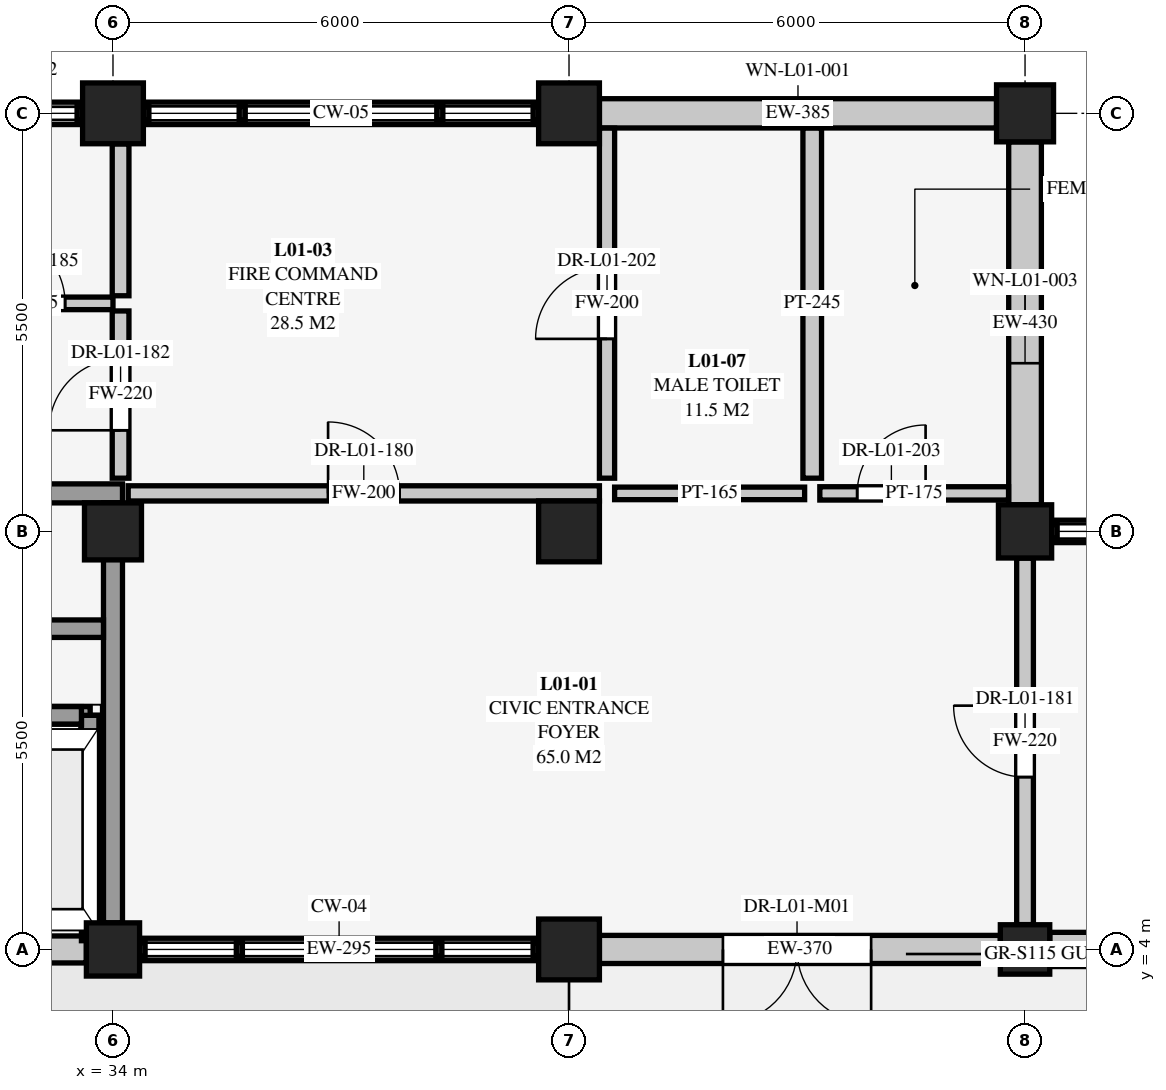
"""IFC4 building model, lengths in metres.
Left out: names, types, materials, properties, quantities, classifications, styles, units other than length and angle.
Written with IfcOpenShell. Run it as: python <this file> out.ifc"""

import sys

from ifc_helpers import new_model, si_unit, direction, frame, frame_2d, origin, origin_2d, place, context, subcontext, project, spatial, rectangle, extrude, element, fill, save


model = new_model("IFC4")
c1 = context("Model", 3, precision=1e-05, world=origin(), true_north=direction((0.0, 1.0)))
c2 = subcontext(c1, "Body", "Model", "MODEL_VIEW")
j1 = project(units=[si_unit("LENGTHUNIT", "METRE"), si_unit("PLANEANGLEUNIT", "RADIAN")], contexts=[c1])
p1 = place(None, origin())
s1 = spatial("IfcSite", under=j1, at=p1, CompositionType="ELEMENT")
p2 = place(p1, origin())
s2 = spatial("IfcBuilding", under=s1, at=p2, CompositionType="ELEMENT")
p3 = place(p2, origin())
s3 = spatial("IfcBuildingStorey", under=s2, at=p3, CompositionType="ELEMENT", Elevation=0.0)
p4 = place(p3, frame((34.0, 4.0, 0.0), z_axis=(0.0, 0.0, 1.0), x_axis=(1.0, 0.0, 0.0)))
e1 = element("IfcColumn", 1, at=p4, inside=s3, PredefinedType="COLUMN", context=c2, shape_type="SweptSolid", body=[
    extrude(rectangle(XDim=0.7, YDim=0.7, at=origin_2d()), origin(), (0.0, 0.0, 1.0), 4.5),
])
p5 = place(p3, frame((34.0, 9.5, 0.0), z_axis=(0.0, 0.0, 1.0), x_axis=(1.0, 0.0, 0.0)))
e2 = element("IfcColumn", 2, at=p5, inside=s3, PredefinedType="COLUMN", context=c2, shape_type="SweptSolid", body=[
    extrude(rectangle(XDim=0.75, YDim=0.75, at=origin_2d()), origin(), (0.0, 0.0, 1.0), 4.5),
])
for number, where, z_axis, x_axis in (
    (3, (34.0, 15.0, 0.0), (0.0, 0.0, 1.0), (1.0, 0.0, 0.0)),
    (4, (40.0, 4.0, 0.0), (0.0, 0.0, 1.0), (1.0, 0.0, 0.0)),
    (5, (40.0, 9.5, 0.0), (0.0, 0.0, 1.0), (1.0, 0.0, 0.0)),
    (6, (40.0, 15.0, 0.0), (0.0, 0.0, 1.0), (1.0, 0.0, 0.0)),
):
    element("IfcColumn", number, at=place(p3, frame(where, z_axis=z_axis, x_axis=x_axis)), inside=s3, PredefinedType="COLUMN", context=c2, shape_type="SweptSolid", body=[
        extrude(rectangle(XDim=0.8, YDim=0.8, at=origin_2d()), origin(), (0.0, 0.0, 1.0), 4.5),
    ])
p6 = place(p3, frame((46.0, 4.0, 0.0), z_axis=(0.0, 0.0, 1.0), x_axis=(1.0, 0.0, 0.0)))
e7 = element("IfcColumn", 7, at=p6, inside=s3, PredefinedType="COLUMN", context=c2, shape_type="SweptSolid", body=[
    extrude(rectangle(XDim=0.65, YDim=0.65, at=origin_2d()), origin(), (0.0, 0.0, 1.0), 4.5),
])
p7 = place(p3, frame((46.0, 9.5, 0.0), z_axis=(0.0, 0.0, 1.0), x_axis=(1.0, 0.0, 0.0)))
e8 = element("IfcColumn", 8, at=p7, inside=s3, PredefinedType="COLUMN", context=c2, shape_type="SweptSolid", body=[
    extrude(rectangle(XDim=0.7, YDim=0.7, at=origin_2d()), origin(), (0.0, 0.0, 1.0), 4.5),
])
p8 = place(p3, frame((46.0, 15.0, 0.0), z_axis=(0.0, 0.0, 1.0), x_axis=(1.0, 0.0, 0.0)))
e9 = element("IfcColumn", 9, at=p8, inside=s3, PredefinedType="COLUMN", context=c2, shape_type="SweptSolid", body=[
    extrude(rectangle(XDim=0.75, YDim=0.75, at=origin_2d()), origin(), (0.0, 0.0, 1.0), 4.5),
])
p9 = place(p3, frame((33.65, 4.0, 0.0), z_axis=(0.0, 0.0, 1.0), x_axis=(-1.0, 0.0, 0.0)))
e10 = element("IfcWall", 10, at=p9, inside=s3, PredefinedType="SOLIDWALL", context=c2, shape_type="SweptSolid", body=[
    extrude(rectangle(XDim=5.325, YDim=0.355, at=frame_2d((2.663, 0.0))), origin(), (0.0, 0.0, 1.0), 3.881),
])
p10 = place(p3, frame((28.375, 15.0, 0.0), z_axis=(0.0, 0.0, 1.0), x_axis=(1.0, 0.0, 0.0)))
e11 = element("IfcWall", 11, at=p10, inside=s3, PredefinedType="SOLIDWALL", context=c2, shape_type="SweptSolid", body=[
    extrude(rectangle(XDim=5.225, YDim=0.295, at=frame_2d((2.613, 0.0))), origin(), (0.0, 0.0, 1.0), 0.26),
])
p11 = place(p3, frame((39.6, 4.0, 0.0), z_axis=(0.0, 0.0, 1.0), x_axis=(-1.0, 0.0, 0.0)))
e12 = element("IfcWall", 12, at=p11, inside=s3, PredefinedType="SOLIDWALL", context=c2, shape_type="SweptSolid", body=[
    extrude(rectangle(XDim=5.25, YDim=0.295, at=frame_2d((2.625, 0.0))), origin(), (0.0, 0.0, 1.0), 0.31),
])
p12 = place(p3, frame((34.4, 15.0, 0.0), z_axis=(0.0, 0.0, 1.0), x_axis=(1.0, 0.0, 0.0)))
e13 = element("IfcWall", 13, at=p12, inside=s3, PredefinedType="SOLIDWALL", context=c2, shape_type="SweptSolid", body=[
    extrude(rectangle(XDim=5.2, YDim=0.295, at=frame_2d((2.6, 0.0))), origin(), (0.0, 0.0, 1.0), 0.36),
])
p13 = place(p3, frame((45.675, 4.0, 0.0), z_axis=(0.0, 0.0, 1.0), x_axis=(-1.0, 0.0, 0.0)))
e14 = element("IfcWall", 14, at=p13, inside=s3, PredefinedType="SOLIDWALL", context=c2, shape_type="SweptSolid", body=[
    extrude(rectangle(XDim=5.275, YDim=0.37, at=frame_2d((2.638, 0.0))), origin(), (0.0, 0.0, 1.0), 3.869),
])
p14 = place(p13, frame((1.7, 0.0, 0.0)))
e15 = element("IfcOpeningElement", 15, at=p14, cuts=e14, PredefinedType="OPENING", context=c2, shape_type="SweptSolid", body=[
    extrude(rectangle(XDim=1.95, YDim=2.3, at=frame_2d((0.975, 1.15))), frame((0.0, 0.195, 0.0), z_axis=(0.0, -1.0, 0.0), x_axis=(1.0, 0.0, 0.0)), (0.0, 0.0, 1.0), 0.39),
])
p15 = place(p3, frame((40.4, 15.0, 0.0), z_axis=(0.0, 0.0, 1.0), x_axis=(1.0, 0.0, 0.0)))
e16 = element("IfcWall", 16, at=p15, inside=s3, PredefinedType="SOLIDWALL", context=c2, shape_type="SweptSolid", body=[
    extrude(rectangle(XDim=5.225, YDim=0.385, at=frame_2d((2.613, 0.0))), origin(), (0.0, 0.0, 1.0), 3.881),
])
p16 = place(p15, frame((2.188, 0.0, 0.9)))
e17 = element("IfcOpeningElement", 17, at=p16, cuts=e16, PredefinedType="OPENING", context=c2, shape_type="SweptSolid", body=[
    extrude(rectangle(XDim=0.85, YDim=1.95, at=frame_2d((0.425, 0.975))), frame((0.0, 0.202, 0.0), z_axis=(0.0, -1.0, 0.0), x_axis=(1.0, 0.0, 0.0)), (0.0, 0.0, 1.0), 0.405),
])
p17 = place(p3, frame((46.0, 14.625, 0.0), z_axis=(0.0, 0.0, 1.0), x_axis=(0.0, -1.0, 0.0)))
e18 = element("IfcWall", 18, at=p17, inside=s3, PredefinedType="SOLIDWALL", context=c2, shape_type="SweptSolid", body=[
    extrude(rectangle(XDim=4.775, YDim=0.43, at=frame_2d((2.387, 0.0))), origin(), (0.0, 0.0, 1.0), 3.869),
])
p18 = place(p17, frame((1.863, 0.0, 0.85)))
e19 = element("IfcOpeningElement", 19, at=p18, cuts=e18, PredefinedType="OPENING", context=c2, shape_type="SweptSolid", body=[
    extrude(rectangle(XDim=1.05, YDim=2.05, at=frame_2d((0.525, 1.025))), frame((0.0, 0.225, 0.0), z_axis=(0.0, -1.0, 0.0), x_axis=(1.0, 0.0, 0.0)), (0.0, 0.0, 1.0), 0.45),
])
p19 = place(p3, frame((51.65, 4.0, 0.0), z_axis=(0.0, 0.0, 1.0), x_axis=(-1.0, 0.0, 0.0)))
e20 = element("IfcWall", 20, at=p19, inside=s3, PredefinedType="SOLIDWALL", context=c2, shape_type="SweptSolid", body=[
    extrude(rectangle(XDim=5.325, YDim=0.45, at=frame_2d((2.663, 0.0))), origin(), (0.0, 0.0, 1.0), 3.869),
])
p20 = place(p19, frame((2.087, 0.0, 0.85)))
e21 = element("IfcOpeningElement", 21, at=p20, cuts=e20, PredefinedType="OPENING", context=c2, shape_type="SweptSolid", body=[
    extrude(rectangle(XDim=1.15, YDim=2.05, at=frame_2d((0.575, 1.025))), frame((0.0, 0.235, 0.0), z_axis=(0.0, -1.0, 0.0), x_axis=(1.0, 0.0, 0.0)), (0.0, 0.0, 1.0), 0.47),
])
p21 = place(p3, frame((46.35, 9.5, 0.0), z_axis=(0.0, 0.0, 1.0), x_axis=(1.0, 0.0, 0.0)))
e22 = element("IfcWall", 22, at=p21, inside=s3, PredefinedType="SOLIDWALL", context=c2, shape_type="SweptSolid", body=[
    extrude(rectangle(XDim=5.275, YDim=0.295, at=frame_2d((2.637, 0.0))), origin(), (0.0, 0.0, 1.0), 0.41),
])
p22 = place(p3, frame((31.88, 4.42, -1.05), z_axis=(0.0, 0.0, 1.0), x_axis=(1.0, 0.0, 0.0)))
e23 = element("IfcWall", 23, at=p22, inside=s3, PredefinedType="SHEAR", context=c2, shape_type="SweptSolid", body=[
    extrude(rectangle(XDim=1.82, YDim=0.23, at=frame_2d((0.91, 0.0))), origin(), (0.0, 0.0, 1.0), 1.05),
])
p23 = place(p3, frame((33.7, 4.42, -1.05), z_axis=(0.0, 0.0, 1.0), x_axis=(0.0, 1.0, 0.0)))
e24 = element("IfcWall", 24, at=p23, inside=s3, PredefinedType="SHEAR", context=c2, shape_type="SweptSolid", body=[
    extrude(rectangle(XDim=2.66, YDim=0.23, at=frame_2d((1.33, 0.0))), origin(), (0.0, 0.0, 1.0), 1.05),
])
p24 = place(p3, frame((33.7, 7.08, -1.05), z_axis=(0.0, 0.0, 1.0), x_axis=(-1.0, 0.0, 0.0)))
e25 = element("IfcWall", 25, at=p24, inside=s3, PredefinedType="SHEAR", context=c2, shape_type="SweptSolid", body=[
    extrude(rectangle(XDim=1.82, YDim=0.23, at=frame_2d((0.91, 0.0))), origin(), (0.0, 0.0, 1.0), 1.05),
])
p25 = place(p3, frame((28.0, 10.0, 0.0), z_axis=(0.0, 0.0, 1.0), x_axis=(1.0, 0.0, 0.0)))
e26 = element("IfcWall", 26, at=p25, inside=s3, PredefinedType="SHEAR", context=c2, shape_type="SweptSolid", body=[
    extrude(rectangle(XDim=6.125, YDim=0.25, at=frame_2d((3.062, 0.0))), origin(), (0.0, 0.0, 1.0), 4.288),
])
p26 = place(p25, frame((1.66, 0.0, 0.0)))
e27 = element("IfcOpeningElement", 27, at=p26, cuts=e26, PredefinedType="OPENING", context=c2, shape_type="SweptSolid", body=[
    extrude(rectangle(XDim=1.38, YDim=2.16, at=frame_2d((0.69, 1.08))), frame((0.0, 0.135, 0.0), z_axis=(0.0, -1.0, 0.0), x_axis=(1.0, 0.0, 0.0)), (0.0, 0.0, 1.0), 0.27),
])
p27 = place(p3, frame((34.0, 4.35, 0.0), z_axis=(0.0, 0.0, 1.0), x_axis=(0.0, 1.0, 0.0)))
e28 = element("IfcWall", 28, at=p27, inside=s3, PredefinedType="SHEAR", context=c2, shape_type="SweptSolid", body=[
    extrude(rectangle(XDim=5.525, YDim=0.25, at=frame_2d((2.762, 0.0))), origin(), (0.0, 0.0, 1.0), 4.288),
])
p28 = place(p3, frame((32.005, 4.42, 0.0), z_axis=(0.0, 0.0, 1.0), x_axis=(1.0, 0.0, 0.0)))
e29 = element("IfcWall", 29, at=p28, inside=s3, PredefinedType="SHEAR", context=c2, shape_type="SweptSolid", body=[
    extrude(rectangle(XDim=1.58, YDim=0.23, at=frame_2d((0.79, 0.0))), origin(), (0.0, 0.0, 1.0), 4.5),
])
p29 = place(p3, frame((33.7, 4.115, 0.0), z_axis=(0.0, 0.0, 1.0), x_axis=(0.0, 1.0, 0.0)))
e30 = element("IfcWall", 30, at=p29, inside=s3, PredefinedType="SHEAR", context=c2, shape_type="SweptSolid", body=[
    extrude(rectangle(XDim=2.965, YDim=0.23, at=frame_2d((1.482, 0.0))), origin(), (0.0, 0.0, 1.0), 4.5),
])
p30 = place(p3, frame((32.005, 7.08, 0.0), z_axis=(0.0, 0.0, 1.0), x_axis=(1.0, 0.0, 0.0)))
e31 = element("IfcWall", 31, at=p30, inside=s3, PredefinedType="SHEAR", context=c2, shape_type="SweptSolid", body=[
    extrude(rectangle(XDim=1.58, YDim=0.23, at=frame_2d((0.79, 0.0))), origin(), (0.0, 0.0, 1.0), 4.5),
])
p31 = place(p3, frame((32.005, 8.22, 0.0), z_axis=(0.0, 0.0, 1.0), x_axis=(1.0, 0.0, 0.0)))
e32 = element("IfcWall", 32, at=p31, inside=s3, PredefinedType="SHEAR", context=c2, shape_type="SweptSolid", body=[
    extrude(rectangle(XDim=1.87, YDim=0.23, at=frame_2d((0.935, 0.0))), origin(), (0.0, 0.0, 1.0), 4.288),
])
p32 = place(p3, frame((34.2, 10.0, 0.0), z_axis=(0.0, 0.0, 1.0), x_axis=(1.0, 0.0, 0.0)))
e33 = element("IfcWall", 33, at=p32, inside=s3, PredefinedType="SOLIDWALL", context=c2, shape_type="SweptSolid", body=[
    extrude(rectangle(XDim=6.2, YDim=0.2, at=frame_2d((3.1, 0.0))), origin(), (0.0, 0.0, 1.0), 4.288),
])
p33 = place(p32, frame((2.63, 0.0, 0.0)))
e34 = element("IfcOpeningElement", 34, at=p33, cuts=e33, PredefinedType="OPENING", context=c2, shape_type="SweptSolid", body=[
    extrude(rectangle(XDim=0.94, YDim=2.1, at=frame_2d((0.47, 1.05))), frame((0.0, 0.11, 0.0), z_axis=(0.0, -1.0, 0.0), x_axis=(1.0, 0.0, 0.0)), (0.0, 0.0, 1.0), 0.22),
])
p34 = place(p3, frame((40.6, 10.0, 0.0), z_axis=(0.0, 0.0, 1.0), x_axis=(1.0, 0.0, 0.0)))
e35 = element("IfcWall", 35, at=p34, inside=s3, PredefinedType="PARTITIONING", context=c2, shape_type="SweptSolid", body=[
    extrude(rectangle(XDim=2.5, YDim=0.165, at=frame_2d((1.25, 0.0))), origin(), (0.0, 0.0, 1.0), 4.288),
])
p35 = place(p3, frame((43.3, 10.0, 0.0), z_axis=(0.0, 0.0, 1.0), x_axis=(1.0, 0.0, 0.0)))
e36 = element("IfcWall", 36, at=p35, inside=s3, PredefinedType="PARTITIONING", context=c2, shape_type="SweptSolid", body=[
    extrude(rectangle(XDim=2.483, YDim=0.175, at=frame_2d((1.241, 0.0))), origin(), (0.0, 0.0, 1.0), 4.288),
])
p36 = place(p35, frame((0.491, 0.0, 0.0)))
e37 = element("IfcOpeningElement", 37, at=p36, cuts=e36, PredefinedType="OPENING", context=c2, shape_type="SweptSolid", body=[
    extrude(rectangle(XDim=0.9, YDim=2.1, at=frame_2d((0.45, 1.05))), frame((0.0, 0.097, 0.0), z_axis=(0.0, -1.0, 0.0), x_axis=(1.0, 0.0, 0.0)), (0.0, 0.0, 1.0), 0.195),
])
p37 = place(p3, frame((46.0, 4.327, 0.0), z_axis=(0.0, 0.0, 1.0), x_axis=(0.0, 1.0, 0.0)))
e38 = element("IfcWall", 38, at=p37, inside=s3, PredefinedType="SOLIDWALL", context=c2, shape_type="SweptSolid", body=[
    extrude(rectangle(XDim=4.821, YDim=0.22, at=frame_2d((2.411, 0.0))), origin(), (0.0, 0.0, 1.0), 3.922),
])
p38 = place(p37, frame((1.94, 0.0, 0.0)))
e39 = element("IfcOpeningElement", 39, at=p38, cuts=e38, PredefinedType="OPENING", context=c2, shape_type="SweptSolid", body=[
    extrude(rectangle(XDim=0.94, YDim=2.1, at=frame_2d((0.47, 1.05))), frame((0.0, 0.12, 0.0), z_axis=(0.0, -1.0, 0.0), x_axis=(1.0, 0.0, 0.0)), (0.0, 0.0, 1.0), 0.24),
])
p39 = place(p3, frame((34.1, 10.2, 0.0), z_axis=(0.0, 0.0, 1.0), x_axis=(0.0, 1.0, 0.0)))
e40 = element("IfcWall", 40, at=p39, inside=s3, PredefinedType="SOLIDWALL", context=c2, shape_type="SweptSolid", body=[
    extrude(rectangle(XDim=2.2, YDim=0.22, at=frame_2d((1.1, 0.0))), origin(), (0.0, 0.0, 1.0), 3.934),
])
p40 = place(p39, frame((0.63, 0.0, 0.0)))
e41 = element("IfcOpeningElement", 41, at=p40, cuts=e40, PredefinedType="OPENING", context=c2, shape_type="SweptSolid", body=[
    extrude(rectangle(XDim=0.94, YDim=2.1, at=frame_2d((0.47, 1.05))), frame((0.0, 0.12, 0.0), z_axis=(0.0, -1.0, 0.0), x_axis=(1.0, 0.0, 0.0)), (0.0, 0.0, 1.0), 0.24),
])
p41 = place(p3, frame((31.8, 12.5, 0.0), z_axis=(0.0, 0.0, 1.0), x_axis=(1.0, 0.0, 0.0)))
e42 = element("IfcWall", 42, at=p41, inside=s3, PredefinedType="PARTITIONING", context=c2, shape_type="SweptSolid", body=[
    extrude(rectangle(XDim=2.2, YDim=0.165, at=frame_2d((1.1, 0.0))), origin(), (0.0, 0.0, 1.0), 4.288),
])
p42 = place(p41, frame((0.63, 0.0, 0.0)))
e43 = element("IfcOpeningElement", 43, at=p42, cuts=e42, PredefinedType="OPENING", context=c2, shape_type="SweptSolid", body=[
    extrude(rectangle(XDim=0.94, YDim=2.1, at=frame_2d((0.47, 1.05))), frame((0.0, 0.093, 0.0), z_axis=(0.0, -1.0, 0.0), x_axis=(1.0, 0.0, 0.0)), (0.0, 0.0, 1.0), 0.185),
])
p43 = place(p3, frame((34.1, 12.6, 0.0), z_axis=(0.0, 0.0, 1.0), x_axis=(0.0, 1.0, 0.0)))
e44 = element("IfcWall", 44, at=p43, inside=s3, PredefinedType="SOLIDWALL", context=c2, shape_type="SweptSolid", body=[
    extrude(rectangle(XDim=1.998, YDim=0.22, at=frame_2d((0.999, 0.0))), origin(), (0.0, 0.0, 1.0), 3.934),
])
p44 = place(p3, frame((40.5, 10.2, 0.0), z_axis=(0.0, 0.0, 1.0), x_axis=(0.0, 1.0, 0.0)))
e45 = element("IfcWall", 45, at=p44, inside=s3, PredefinedType="SOLIDWALL", context=c2, shape_type="SweptSolid", body=[
    extrude(rectangle(XDim=4.605, YDim=0.2, at=frame_2d((2.303, 0.0))), origin(), (0.0, 0.0, 1.0), 4.288),
])
p45 = place(p44, frame((1.833, 0.0, 0.0)))
e46 = element("IfcOpeningElement", 46, at=p45, cuts=e45, PredefinedType="OPENING", context=c2, shape_type="SweptSolid", body=[
    extrude(rectangle(XDim=0.94, YDim=2.1, at=frame_2d((0.47, 1.05))), frame((0.0, 0.11, 0.0), z_axis=(0.0, -1.0, 0.0), x_axis=(1.0, 0.0, 0.0)), (0.0, 0.0, 1.0), 0.22),
])
p46 = place(p3, frame((43.2, 10.2, 0.0), z_axis=(0.0, 0.0, 1.0), x_axis=(0.0, 1.0, 0.0)))
e47 = element("IfcWall", 47, at=p46, inside=s3, PredefinedType="PARTITIONING", context=c2, shape_type="SweptSolid", body=[
    extrude(rectangle(XDim=4.605, YDim=0.245, at=frame_2d((2.303, 0.0))), origin(), (0.0, 0.0, 1.0), 4.288),
])
p47 = place(p14, origin())
e48 = element("IfcDoor", 48, at=p47, inside=s3, OperationType="DOUBLE_DOOR_SINGLE_SWING", PredefinedType="DOOR", context=c2, shape_type="SweptSolid", body=[
    extrude(rectangle(XDim=1.95, YDim=2.3, at=frame_2d((0.975, 1.15))), frame((0.0, 0.025, 0.0), z_axis=(0.0, -1.0, 0.0), x_axis=(1.0, 0.0, 0.0)), (0.0, 0.0, 1.0), 0.05),
])
fill(e15, e48)
p48 = place(p16, origin())
e49 = element("IfcWindow", 49, at=p48, inside=s3, PartitioningType="SINGLE_PANEL", PredefinedType="WINDOW", context=c2, shape_type="SweptSolid", body=[
    extrude(rectangle(XDim=0.85, YDim=1.95, at=frame_2d((0.425, 0.975))), frame((0.0, 0.03, 0.0), z_axis=(0.0, -1.0, 0.0), x_axis=(1.0, 0.0, 0.0)), (0.0, 0.0, 1.0), 0.06),
])
fill(e17, e49)
p49 = place(p18, origin())
e50 = element("IfcWindow", 50, at=p49, inside=s3, PartitioningType="SINGLE_PANEL", PredefinedType="WINDOW", context=c2, shape_type="SweptSolid", body=[
    extrude(rectangle(XDim=1.05, YDim=2.05, at=frame_2d((0.525, 1.025))), frame((0.0, 0.03, 0.0), z_axis=(0.0, -1.0, 0.0), x_axis=(1.0, 0.0, 0.0)), (0.0, 0.0, 1.0), 0.06),
])
fill(e19, e50)
p50 = place(p33, origin())
e51 = element("IfcDoor", 51, at=p50, inside=s3, OperationType="SINGLE_SWING_LEFT", PredefinedType="DOOR", context=c2, shape_type="SweptSolid", body=[
    extrude(rectangle(XDim=0.94, YDim=2.1, at=frame_2d((0.47, 1.05))), frame((0.0, 0.025, 0.0), z_axis=(0.0, -1.0, 0.0), x_axis=(1.0, 0.0, 0.0)), (0.0, 0.0, 1.0), 0.05),
])
fill(e34, e51)
p51 = place(p38, origin())
e52 = element("IfcDoor", 52, at=p51, inside=s3, OperationType="SINGLE_SWING_RIGHT", PredefinedType="DOOR", context=c2, shape_type="SweptSolid", body=[
    extrude(rectangle(XDim=0.94, YDim=2.1, at=frame_2d((0.47, 1.05))), frame((0.0, 0.025, 0.0), z_axis=(0.0, -1.0, 0.0), x_axis=(1.0, 0.0, 0.0)), (0.0, 0.0, 1.0), 0.05),
])
fill(e39, e52)
p52 = place(p40, origin())
e53 = element("IfcDoor", 53, at=p52, inside=s3, OperationType="SINGLE_SWING_LEFT", PredefinedType="DOOR", context=c2, shape_type="SweptSolid", body=[
    extrude(rectangle(XDim=0.94, YDim=2.1, at=frame_2d((0.47, 1.05))), frame((0.0, 0.025, 0.0), z_axis=(0.0, -1.0, 0.0), x_axis=(1.0, 0.0, 0.0)), (0.0, 0.0, 1.0), 0.05),
])
fill(e41, e53)
p53 = place(p42, origin())
e54 = element("IfcDoor", 54, at=p53, inside=s3, OperationType="SINGLE_SWING_LEFT", PredefinedType="DOOR", context=c2, shape_type="SweptSolid", body=[
    extrude(rectangle(XDim=0.94, YDim=2.1, at=frame_2d((0.47, 1.05))), frame((0.0, 0.025, 0.0), z_axis=(0.0, -1.0, 0.0), x_axis=(1.0, 0.0, 0.0)), (0.0, 0.0, 1.0), 0.05),
])
fill(e43, e54)
p54 = place(p45, origin())
e55 = element("IfcDoor", 55, at=p54, inside=s3, OperationType="SINGLE_SWING_LEFT", PredefinedType="DOOR", context=c2, shape_type="SweptSolid", body=[
    extrude(rectangle(XDim=0.94, YDim=2.1, at=frame_2d((0.47, 1.05))), frame((0.0, 0.025, 0.0), z_axis=(0.0, -1.0, 0.0), x_axis=(1.0, 0.0, 0.0)), (0.0, 0.0, 1.0), 0.05),
])
fill(e46, e55)
p55 = place(p36, origin())
e56 = element("IfcDoor", 56, at=p55, inside=s3, OperationType="SINGLE_SWING_RIGHT", PredefinedType="DOOR", context=c2, shape_type="SweptSolid", body=[
    extrude(rectangle(XDim=0.9, YDim=2.1, at=frame_2d((0.45, 1.05))), frame((0.0, 0.025, 0.0), z_axis=(0.0, -1.0, 0.0), x_axis=(1.0, 0.0, 0.0)), (0.0, 0.0, 1.0), 0.05),
])
fill(e37, e56)
save(model, sys.argv[1])
